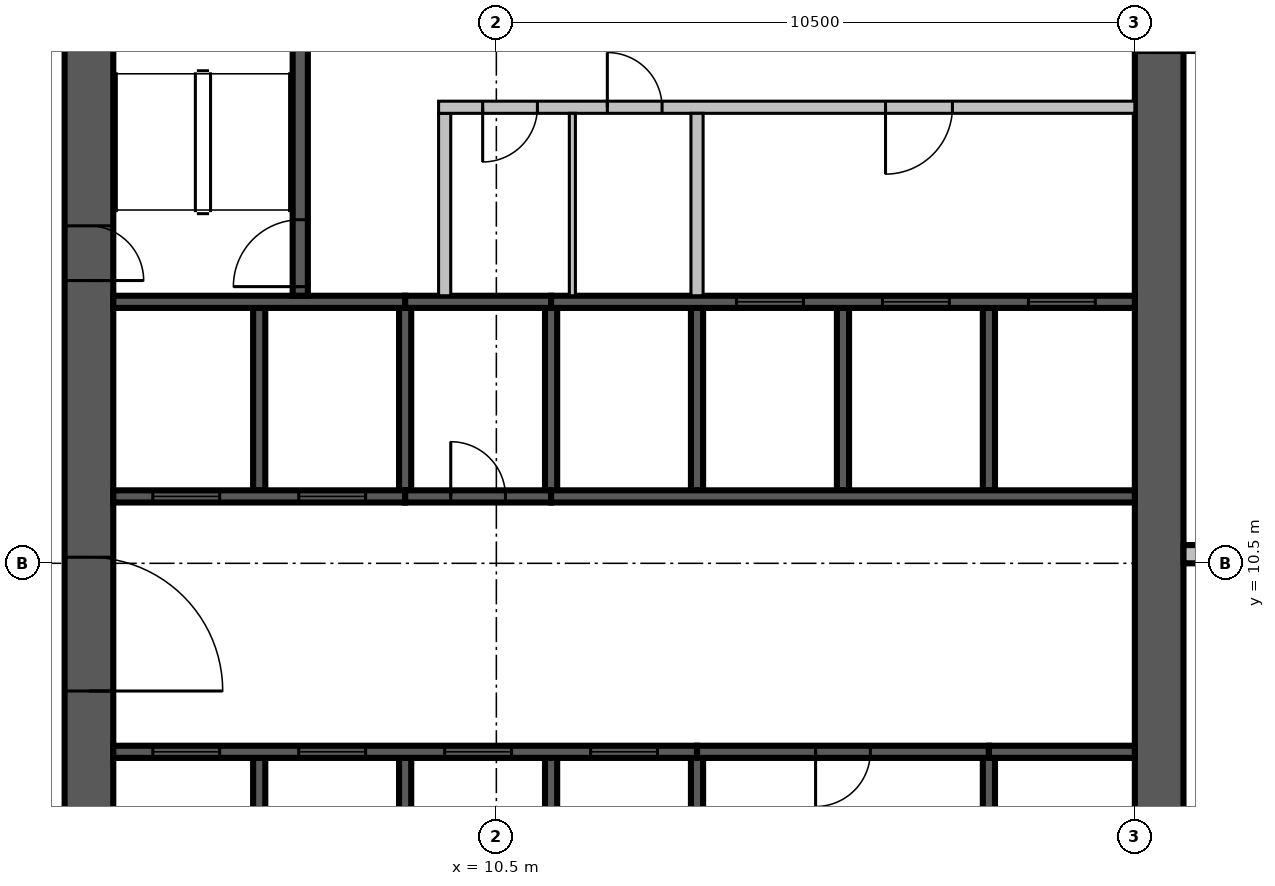
"""IFC4 building model, lengths in metres.
Left out: names, types, materials, properties, quantities, classifications, styles, units other than length and angle.
Written with IfcOpenShell. Run it as: python <this file> out.ifc"""

import sys

from ifc_helpers import new_model, si_unit, direction, frame, frame_2d, origin, place, context, subcontext, project, spatial, rectangle, extrude, source, transform, mapped, element, fill, save


model = new_model("IFC4")
c1 = context("Model", 3, precision=1e-05, world=origin(), true_north=direction((0.0, 1.0)))
c2 = subcontext(c1, "Body", "Model", "MODEL_VIEW")
j1 = project(units=[si_unit("LENGTHUNIT", "METRE"), si_unit("PLANEANGLEUNIT", "RADIAN")], contexts=[c1])
p1 = place(None, origin())
s1 = spatial("IfcSite", under=j1, at=p1, CompositionType="ELEMENT")
p2 = place(p1, origin())
s2 = spatial("IfcBuilding", under=s1, at=p2, CompositionType="ELEMENT")
p3 = place(p2, frame((0.0, 0.0, 208.2)))
s3 = spatial("IfcBuildingStorey", under=s2, at=p3, CompositionType="ELEMENT", Elevation=208.2)
m1 = source(origin(), c2, "Body", "SweptSolid", [
    extrude(rectangle(XDim=17.6, YDim=0.8, at=frame_2d((8.8, 0.0))), origin(), (0.0, 0.0, 1.0), 3.8),
])
p4 = place(p3, frame((3.8, 4.2, 0.0), z_axis=(0.0, 0.0, 1.0), x_axis=(0.0, 1.0, 0.0)))
e1 = element("IfcWall", 1, at=p4, inside=s3, PredefinedType="SHEAR", context=c2, shape_type="MappedRepresentation", body=[
    mapped(m1, transform((0.0, 0.0, 0.0), scale=1.0)),
])
m2 = source(origin(), c2, "Body", "SweptSolid", [
    extrude(rectangle(XDim=2.2, YDim=2.1, at=frame_2d((1.1, 1.05))), frame((0.0, 0.41, 0.0), z_axis=(0.0, -1.0, 0.0), x_axis=(1.0, 0.0, 0.0)), (0.0, 0.0, 1.0), 0.82),
])
p5 = place(p4, frame((4.2, 0.0, 0.0)))
e2 = element("IfcOpeningElement", 2, at=p5, cuts=e1, PredefinedType="OPENING", context=c2, shape_type="MappedRepresentation", body=[
    mapped(m2, transform((0.0, 0.0, 0.0), scale=1.0)),
])
m3 = source(origin(), c2, "Body", "SweptSolid", [
    extrude(rectangle(XDim=0.9, YDim=2.1, at=frame_2d((0.45, 1.05))), frame((0.0, 0.41, 0.0), z_axis=(0.0, -1.0, 0.0), x_axis=(1.0, 0.0, 0.0)), (0.0, 0.0, 1.0), 0.82),
])
p6 = place(p4, frame((10.95, 0.0, 0.0)))
e3 = element("IfcOpeningElement", 3, at=p6, cuts=e1, PredefinedType="OPENING", context=c2, shape_type="MappedRepresentation", body=[
    mapped(m3, transform((0.0, 0.0, 0.0), scale=1.0)),
])
m4 = source(origin(), c2, "Body", "SweptSolid", [
    extrude(rectangle(XDim=16.8, YDim=0.8, at=frame_2d((8.4, 0.0))), origin(), (0.0, 0.0, 1.0), 3.8),
])
p7 = place(p3, frame((21.4, 4.2, 0.0), z_axis=(0.0, 0.0, 1.0), x_axis=(0.0, 1.0, 0.0)))
e4 = element("IfcWall", 4, at=p7, inside=s3, PredefinedType="SHEAR", context=c2, shape_type="MappedRepresentation", body=[
    mapped(m4, transform((0.0, 0.0, 0.0), scale=1.0)),
])
m5 = source(origin(), c2, "Body", "SweptSolid", [
    extrude(rectangle(XDim=1.2, YDim=2.1, at=frame_2d((0.6, 1.05))), frame((0.0, 0.41, 0.0), z_axis=(0.0, -1.0, 0.0), x_axis=(1.0, 0.0, 0.0)), (0.0, 0.0, 1.0), 0.82),
])
p8 = place(p7, frame((14.7, 0.0, 0.0)))
e5 = element("IfcOpeningElement", 5, at=p8, cuts=e4, PredefinedType="OPENING", context=c2, shape_type="MappedRepresentation", body=[
    mapped(m5, transform((0.0, 0.0, 0.0), scale=1.0)),
])
m6 = source(origin(), c2, "Body", "SweptSolid", [
    extrude(rectangle(XDim=7.15, YDim=0.3, at=frame_2d((3.575, 0.0))), origin(), (0.0, 0.0, 1.0), 3.4),
])
p9 = place(p3, frame((21.8, 10.65, 0.0), z_axis=(0.0, 0.0, 1.0), x_axis=(1.0, 0.0, 0.0)))
e6 = element("IfcWall", 6, at=p9, inside=s3, PredefinedType="STANDARD", context=c2, shape_type="MappedRepresentation", body=[
    mapped(m6, transform((0.0, 0.0, 0.0), scale=1.0)),
])
m7 = source(origin(), c2, "Body", "SweptSolid", [
    extrude(rectangle(XDim=1.8, YDim=2.3, at=frame_2d((0.9, 1.15))), frame((0.0, 0.16, 0.0), z_axis=(0.0, -1.0, 0.0), x_axis=(1.0, 0.0, 0.0)), (0.0, 0.0, 1.0), 0.32),
])
p10 = place(p9, frame((0.4, 0.0, 0.6)))
e7 = element("IfcOpeningElement", 7, at=p10, cuts=e6, PredefinedType="OPENING", context=c2, shape_type="MappedRepresentation", body=[
    mapped(m7, transform((0.0, 0.0, 0.0), scale=1.0)),
])
m8 = source(origin(), c2, "Body", "SweptSolid", [
    extrude(rectangle(XDim=3.0, YDim=2.3, at=frame_2d((1.5, 1.15))), frame((0.0, 0.16, 0.0), z_axis=(0.0, -1.0, 0.0), x_axis=(1.0, 0.0, 0.0)), (0.0, 0.0, 1.0), 0.32),
])
p11 = place(p9, frame((4.0, 0.0, 0.6)))
e8 = element("IfcOpeningElement", 8, at=p11, cuts=e6, PredefinedType="OPENING", context=c2, shape_type="MappedRepresentation", body=[
    mapped(m8, transform((0.0, 0.0, 0.0), scale=1.0)),
])
m9 = source(origin(), c2, "Body", "SweptSolid", [
    extrude(rectangle(XDim=3.1, YDim=0.2, at=frame_2d((1.55, 0.0))), origin(), (0.0, 0.0, 1.0), 3.8),
])
for number, where, z_axis, x_axis in (
    (9, (6.6, 4.2, 0.0), (0.0, 0.0, 1.0), (0.0, 1.0, 0.0)),
    (10, (9.0, 4.2, 0.0), (0.0, 0.0, 1.0), (0.0, 1.0, 0.0)),
    (11, (11.4, 4.2, 0.0), (0.0, 0.0, 1.0), (0.0, 1.0, 0.0)),
):
    element("IfcWall", number, at=place(p3, frame(where, z_axis=z_axis, x_axis=x_axis)), inside=s3, PredefinedType="SOLIDWALL", context=c2, shape_type="MappedRepresentation", body=[
        mapped(m9, transform((0.0, 0.0, 0.0), scale=1.0)),
    ])
m10 = source(origin(), c2, "Body", "SweptSolid", [
    extrude(rectangle(XDim=3.1, YDim=0.2, at=frame_2d((1.55, 0.0))), origin(), (0.0, 0.0, 1.0), 3.4),
])
for number, where, z_axis, x_axis in (
    (12, (13.8, 4.2, 0.0), (0.0, 0.0, 1.0), (0.0, 1.0, 0.0)),
    (13, (18.6, 4.2, 0.0), (0.0, 0.0, 1.0), (0.0, 1.0, 0.0)),
):
    element("IfcWall", number, at=place(p3, frame(where, z_axis=z_axis, x_axis=x_axis)), inside=s3, PredefinedType="SOLIDWALL", context=c2, shape_type="MappedRepresentation", body=[
        mapped(m10, transform((0.0, 0.0, 0.0), scale=1.0)),
    ])
m11 = source(origin(), c2, "Body", "SweptSolid", [
    extrude(rectangle(XDim=3.0, YDim=0.2, at=frame_2d((1.5, 0.0))), origin(), (0.0, 0.0, 1.0), 3.8),
])
p12 = place(p3, frame((6.6, 11.7, 0.0), z_axis=(0.0, 0.0, 1.0), x_axis=(0.0, 1.0, 0.0)))
e14 = element("IfcWall", 14, at=p12, inside=s3, PredefinedType="SOLIDWALL", context=c2, shape_type="MappedRepresentation", body=[
    mapped(m11, transform((0.0, 0.0, 0.0), scale=1.0)),
])
m12 = source(origin(), c2, "Body", "SweptSolid", [
    extrude(rectangle(XDim=3.0, YDim=0.2, at=frame_2d((1.5, 0.0))), origin(), (0.0, 0.0, 1.0), 3.4),
])
for number, where, z_axis, x_axis in (
    (15, (9.0, 11.7, 0.0), (0.0, 0.0, 1.0), (0.0, 1.0, 0.0)),
    (16, (11.4, 11.7, 0.0), (0.0, 0.0, 1.0), (0.0, 1.0, 0.0)),
):
    element("IfcWall", number, at=place(p3, frame(where, z_axis=z_axis, x_axis=x_axis)), inside=s3, PredefinedType="SOLIDWALL", context=c2, shape_type="MappedRepresentation", body=[
        mapped(m12, transform((0.0, 0.0, 0.0), scale=1.0)),
    ])
for number, where, z_axis, x_axis in (
    (17, (13.8, 11.7, 0.0), (0.0, 0.0, 1.0), (0.0, 1.0, 0.0)),
    (18, (16.2, 11.7, 0.0), (0.0, 0.0, 1.0), (0.0, 1.0, 0.0)),
    (19, (18.6, 11.7, 0.0), (0.0, 0.0, 1.0), (0.0, 1.0, 0.0)),
):
    element("IfcWall", number, at=place(p3, frame(where, z_axis=z_axis, x_axis=x_axis)), inside=s3, PredefinedType="SOLIDWALL", context=c2, shape_type="MappedRepresentation", body=[
        mapped(m11, transform((0.0, 0.0, 0.0), scale=1.0)),
    ])
m13 = source(origin(), c2, "Body", "SweptSolid", [
    extrude(rectangle(XDim=9.6, YDim=0.2, at=frame_2d((4.8, 0.0))), origin(), (0.0, 0.0, 1.0), 3.8),
])
p13 = place(p3, frame((4.2, 7.4, 0.0), z_axis=(0.0, 0.0, 1.0), x_axis=(1.0, 0.0, 0.0)))
e20 = element("IfcWall", 20, at=p13, inside=s3, PredefinedType="SOLIDWALL", context=c2, shape_type="MappedRepresentation", body=[
    mapped(m13, transform((0.0, 0.0, 0.0), scale=1.0)),
])
m14 = source(origin(), c2, "Body", "SweptSolid", [
    extrude(rectangle(XDim=1.1, YDim=2.1, at=frame_2d((0.55, 1.05))), frame((0.0, 0.11, 0.0), z_axis=(0.0, -1.0, 0.0), x_axis=(1.0, 0.0, 0.0)), (0.0, 0.0, 1.0), 0.22),
])
p14 = place(p13, frame((0.65, 0.0, 0.0)))
e21 = element("IfcOpeningElement", 21, at=p14, cuts=e20, PredefinedType="OPENING", context=c2, shape_type="MappedRepresentation", body=[
    mapped(m14, transform((0.0, 0.0, 0.0), scale=1.0)),
])
p15 = place(p13, frame((3.05, 0.0, 0.0)))
e22 = element("IfcOpeningElement", 22, at=p15, cuts=e20, PredefinedType="OPENING", context=c2, shape_type="MappedRepresentation", body=[
    mapped(m14, transform((0.0, 0.0, 0.0), scale=1.0)),
])
p16 = place(p13, frame((5.45, 0.0, 0.0)))
e23 = element("IfcOpeningElement", 23, at=p16, cuts=e20, PredefinedType="OPENING", context=c2, shape_type="MappedRepresentation", body=[
    mapped(m14, transform((0.0, 0.0, 0.0), scale=1.0)),
])
p17 = place(p13, frame((7.85, 0.0, 0.0)))
e24 = element("IfcOpeningElement", 24, at=p17, cuts=e20, PredefinedType="OPENING", context=c2, shape_type="MappedRepresentation", body=[
    mapped(m14, transform((0.0, 0.0, 0.0), scale=1.0)),
])
m15 = source(origin(), c2, "Body", "SweptSolid", [
    extrude(rectangle(XDim=4.8, YDim=0.2, at=frame_2d((2.4, 0.0))), origin(), (0.0, 0.0, 1.0), 3.4),
])
p18 = place(p3, frame((13.8, 7.4, 0.0), z_axis=(0.0, 0.0, 1.0), x_axis=(1.0, 0.0, 0.0)))
e25 = element("IfcWall", 25, at=p18, inside=s3, PredefinedType="SOLIDWALL", context=c2, shape_type="MappedRepresentation", body=[
    mapped(m15, transform((0.0, 0.0, 0.0), scale=1.0)),
])
m16 = source(origin(), c2, "Body", "SweptSolid", [
    extrude(rectangle(XDim=0.9, YDim=2.1, at=frame_2d((0.45, 1.05))), frame((0.0, 0.11, 0.0), z_axis=(0.0, -1.0, 0.0), x_axis=(1.0, 0.0, 0.0)), (0.0, 0.0, 1.0), 0.22),
])
p19 = place(p18, frame((1.95, 0.0, 0.0)))
e26 = element("IfcOpeningElement", 26, at=p19, cuts=e25, PredefinedType="OPENING", context=c2, shape_type="MappedRepresentation", body=[
    mapped(m16, transform((0.0, 0.0, 0.0), scale=1.0)),
])
m17 = source(origin(), c2, "Body", "SweptSolid", [
    extrude(rectangle(XDim=2.4, YDim=0.2, at=frame_2d((1.2, 0.0))), origin(), (0.0, 0.0, 1.0), 3.8),
])
p20 = place(p3, frame((18.6, 7.4, 0.0), z_axis=(0.0, 0.0, 1.0), x_axis=(1.0, 0.0, 0.0)))
e27 = element("IfcWall", 27, at=p20, inside=s3, PredefinedType="SOLIDWALL", context=c2, shape_type="MappedRepresentation", body=[
    mapped(m17, transform((0.0, 0.0, 0.0), scale=1.0)),
])
m18 = source(origin(), c2, "Body", "SweptSolid", [
    extrude(rectangle(XDim=4.8, YDim=0.2, at=frame_2d((2.4, 0.0))), origin(), (0.0, 0.0, 1.0), 3.8),
])
p21 = place(p3, frame((4.2, 11.6, 0.0), z_axis=(0.0, 0.0, 1.0), x_axis=(1.0, 0.0, 0.0)))
e28 = element("IfcWall", 28, at=p21, inside=s3, PredefinedType="SOLIDWALL", context=c2, shape_type="MappedRepresentation", body=[
    mapped(m18, transform((0.0, 0.0, 0.0), scale=1.0)),
])
p22 = place(p21, frame((0.65, 0.0, 0.0)))
e29 = element("IfcOpeningElement", 29, at=p22, cuts=e28, PredefinedType="OPENING", context=c2, shape_type="MappedRepresentation", body=[
    mapped(m14, transform((0.0, 0.0, 0.0), scale=1.0)),
])
p23 = place(p21, frame((3.05, 0.0, 0.0)))
e30 = element("IfcOpeningElement", 30, at=p23, cuts=e28, PredefinedType="OPENING", context=c2, shape_type="MappedRepresentation", body=[
    mapped(m14, transform((0.0, 0.0, 0.0), scale=1.0)),
])
m19 = source(origin(), c2, "Body", "SweptSolid", [
    extrude(rectangle(XDim=2.4, YDim=0.2, at=frame_2d((1.2, 0.0))), origin(), (0.0, 0.0, 1.0), 3.4),
])
p24 = place(p3, frame((9.0, 11.6, 0.0), z_axis=(0.0, 0.0, 1.0), x_axis=(1.0, 0.0, 0.0)))
e31 = element("IfcWall", 31, at=p24, inside=s3, PredefinedType="SOLIDWALL", context=c2, shape_type="MappedRepresentation", body=[
    mapped(m19, transform((0.0, 0.0, 0.0), scale=1.0)),
])
p25 = place(p24, frame((0.75, 0.0, 0.0)))
e32 = element("IfcOpeningElement", 32, at=p25, cuts=e31, PredefinedType="OPENING", context=c2, shape_type="MappedRepresentation", body=[
    mapped(m16, transform((0.0, 0.0, 0.0), scale=1.0)),
])
p26 = place(p3, frame((11.4, 11.6, 0.0), z_axis=(0.0, 0.0, 1.0), x_axis=(1.0, 0.0, 0.0)))
e33 = element("IfcWall", 33, at=p26, inside=s3, PredefinedType="SOLIDWALL", context=c2, shape_type="MappedRepresentation", body=[
    mapped(m13, transform((0.0, 0.0, 0.0), scale=1.0)),
])
p27 = place(p3, frame((4.2, 14.8, 0.0), z_axis=(0.0, 0.0, 1.0), x_axis=(1.0, 0.0, 0.0)))
e34 = element("IfcWall", 34, at=p27, inside=s3, PredefinedType="SOLIDWALL", context=c2, shape_type="MappedRepresentation", body=[
    mapped(m18, transform((0.0, 0.0, 0.0), scale=1.0)),
])
p28 = place(p3, frame((9.0, 14.8, 0.0), z_axis=(0.0, 0.0, 1.0), x_axis=(1.0, 0.0, 0.0)))
e35 = element("IfcWall", 35, at=p28, inside=s3, PredefinedType="SOLIDWALL", context=c2, shape_type="MappedRepresentation", body=[
    mapped(m19, transform((0.0, 0.0, 0.0), scale=1.0)),
])
p29 = place(p3, frame((11.4, 14.8, 0.0), z_axis=(0.0, 0.0, 1.0), x_axis=(1.0, 0.0, 0.0)))
e36 = element("IfcWall", 36, at=p29, inside=s3, PredefinedType="SOLIDWALL", context=c2, shape_type="MappedRepresentation", body=[
    mapped(m13, transform((0.0, 0.0, 0.0), scale=1.0)),
])
p30 = place(p29, frame((3.05, 0.0, 0.0)))
e37 = element("IfcOpeningElement", 37, at=p30, cuts=e36, PredefinedType="OPENING", context=c2, shape_type="MappedRepresentation", body=[
    mapped(m14, transform((0.0, 0.0, 0.0), scale=1.0)),
])
p31 = place(p29, frame((5.45, 0.0, 0.0)))
e38 = element("IfcOpeningElement", 38, at=p31, cuts=e36, PredefinedType="OPENING", context=c2, shape_type="MappedRepresentation", body=[
    mapped(m14, transform((0.0, 0.0, 0.0), scale=1.0)),
])
p32 = place(p29, frame((7.85, 0.0, 0.0)))
e39 = element("IfcOpeningElement", 39, at=p32, cuts=e36, PredefinedType="OPENING", context=c2, shape_type="MappedRepresentation", body=[
    mapped(m14, transform((0.0, 0.0, 0.0), scale=1.0)),
])
m20 = source(origin(), c2, "Body", "SweptSolid", [
    extrude(rectangle(XDim=6.6, YDim=0.25, at=frame_2d((3.3, 0.0))), origin(), (0.0, 0.0, 1.0), 3.4),
])
p33 = place(p3, frame((7.275, 14.9, 0.0), z_axis=(0.0, 0.0, 1.0), x_axis=(0.0, 1.0, 0.0)))
e40 = element("IfcWall", 40, at=p33, inside=s3, PredefinedType="SOLIDWALL", context=c2, shape_type="MappedRepresentation", body=[
    mapped(m20, transform((0.0, 0.0, 0.0), scale=1.0)),
])
m21 = source(origin(), c2, "Body", "SweptSolid", [
    extrude(rectangle(XDim=1.1, YDim=2.1, at=frame_2d((0.55, 1.05))), frame((0.0, 0.135, 0.0), z_axis=(0.0, -1.0, 0.0), x_axis=(1.0, 0.0, 0.0)), (0.0, 0.0, 1.0), 0.27),
])
p34 = place(p33, frame((0.15, 0.0, 0.0)))
e41 = element("IfcOpeningElement", 41, at=p34, cuts=e40, PredefinedType="OPENING", context=c2, shape_type="MappedRepresentation", body=[
    mapped(m21, transform((0.0, 0.0, 0.0), scale=1.0)),
])
m22 = source(origin(), c2, "Body", "SweptSolid", [
    extrude(rectangle(XDim=3.0, YDim=0.2, at=frame_2d((1.5, 0.0))), origin(), (0.0, 0.0, 1.0), 3.4),
])
p35 = place(p3, frame((9.65, 14.9, 0.0), z_axis=(0.0, 0.0, 1.0), x_axis=(0.0, 1.0, 0.0)))
e42 = element("IfcWall", 42, at=p35, inside=s3, PredefinedType="PARTITIONING", context=c2, shape_type="MappedRepresentation", body=[
    mapped(m22, transform((0.0, 0.0, 0.0), scale=1.0)),
])
m23 = source(origin(), c2, "Body", "SweptSolid", [
    extrude(rectangle(XDim=11.45, YDim=0.2, at=frame_2d((5.725, 0.0))), origin(), (0.0, 0.0, 1.0), 3.4),
])
p36 = place(p3, frame((9.55, 18.0, 0.0), z_axis=(0.0, 0.0, 1.0), x_axis=(1.0, 0.0, 0.0)))
e43 = element("IfcWall", 43, at=p36, inside=s3, PredefinedType="PARTITIONING", context=c2, shape_type="MappedRepresentation", body=[
    mapped(m23, transform((0.0, 0.0, 0.0), scale=1.0)),
])
p37 = place(p36, frame((0.725, 0.0, 0.0)))
e44 = element("IfcOpeningElement", 44, at=p37, cuts=e43, PredefinedType="OPENING", context=c2, shape_type="MappedRepresentation", body=[
    mapped(m16, transform((0.0, 0.0, 0.0), scale=1.0)),
])
p38 = place(p36, frame((2.775, 0.0, 0.0)))
e45 = element("IfcOpeningElement", 45, at=p38, cuts=e43, PredefinedType="OPENING", context=c2, shape_type="MappedRepresentation", body=[
    mapped(m16, transform((0.0, 0.0, 0.0), scale=1.0)),
])
p39 = place(p36, frame((7.35, 0.0, 0.0)))
e46 = element("IfcOpeningElement", 46, at=p39, cuts=e43, PredefinedType="OPENING", context=c2, shape_type="MappedRepresentation", body=[
    mapped(m14, transform((0.0, 0.0, 0.0), scale=1.0)),
])
p40 = place(p3, frame((13.8, 14.9, 0.0), z_axis=(0.0, 0.0, 1.0), x_axis=(0.0, 1.0, 0.0)))
e47 = element("IfcWall", 47, at=p40, inside=s3, PredefinedType="PARTITIONING", context=c2, shape_type="MappedRepresentation", body=[
    mapped(m22, transform((0.0, 0.0, 0.0), scale=1.0)),
])
m24 = source(origin(), c2, "Body", "SweptSolid", [
    extrude(rectangle(XDim=3.0, YDim=0.1, at=frame_2d((1.5, 0.0))), origin(), (0.0, 0.0, 1.0), 3.4),
])
p41 = place(p3, frame((11.75, 14.9, 0.0), z_axis=(0.0, 0.0, 1.0), x_axis=(0.0, 1.0, 0.0)))
e48 = element("IfcWall", 48, at=p41, inside=s3, PredefinedType="PARTITIONING", context=c2, shape_type="MappedRepresentation", body=[
    mapped(m24, transform((0.0, 0.0, 0.0), scale=1.0)),
])
m25 = source(origin(), c2, "Body", "SweptSolid", [
    extrude(rectangle(XDim=1.1, YDim=2.1, at=frame_2d((0.55, 1.05))), frame((0.0, 0.025, 0.0), z_axis=(0.0, -1.0, 0.0), x_axis=(1.0, 0.0, 0.0)), (0.0, 0.0, 1.0), 0.05),
])
p42 = place(p14, origin())
e49 = element("IfcDoor", 49, at=p42, inside=s3, OperationType="SLIDING_TO_LEFT", PredefinedType="DOOR", context=c2, shape_type="MappedRepresentation", body=[
    mapped(m25, transform((0.0, 0.0, 0.0), scale=1.0)),
])
fill(e21, e49)
p43 = place(p15, origin())
e50 = element("IfcDoor", 50, at=p43, inside=s3, OperationType="SLIDING_TO_LEFT", PredefinedType="DOOR", context=c2, shape_type="MappedRepresentation", body=[
    mapped(m25, transform((0.0, 0.0, 0.0), scale=1.0)),
])
fill(e22, e50)
p44 = place(p16, origin())
e51 = element("IfcDoor", 51, at=p44, inside=s3, OperationType="SLIDING_TO_LEFT", PredefinedType="DOOR", context=c2, shape_type="MappedRepresentation", body=[
    mapped(m25, transform((0.0, 0.0, 0.0), scale=1.0)),
])
fill(e23, e51)
p45 = place(p17, origin())
e52 = element("IfcDoor", 52, at=p45, inside=s3, OperationType="SLIDING_TO_LEFT", PredefinedType="DOOR", context=c2, shape_type="MappedRepresentation", body=[
    mapped(m25, transform((0.0, 0.0, 0.0), scale=1.0)),
])
fill(e24, e52)
m26 = source(origin(), c2, "Body", "SweptSolid", [
    extrude(rectangle(XDim=0.9, YDim=2.1, at=frame_2d((0.45, 1.05))), frame((0.0, 0.025, 0.0), z_axis=(0.0, -1.0, 0.0), x_axis=(1.0, 0.0, 0.0)), (0.0, 0.0, 1.0), 0.05),
])
p46 = place(p19, origin())
e53 = element("IfcDoor", 53, at=p46, inside=s3, OperationType="SINGLE_SWING_RIGHT", PredefinedType="DOOR", context=c2, shape_type="MappedRepresentation", body=[
    mapped(m26, transform((0.0, 0.0, 0.0), scale=1.0)),
])
fill(e26, e53)
p47 = place(p22, origin())
e54 = element("IfcDoor", 54, at=p47, inside=s3, OperationType="SLIDING_TO_LEFT", PredefinedType="DOOR", context=c2, shape_type="MappedRepresentation", body=[
    mapped(m25, transform((0.0, 0.0, 0.0), scale=1.0)),
])
fill(e29, e54)
p48 = place(p23, origin())
e55 = element("IfcDoor", 55, at=p48, inside=s3, OperationType="SLIDING_TO_LEFT", PredefinedType="DOOR", context=c2, shape_type="MappedRepresentation", body=[
    mapped(m25, transform((0.0, 0.0, 0.0), scale=1.0)),
])
fill(e30, e55)
p49 = place(p25, origin())
e56 = element("IfcDoor", 56, at=p49, inside=s3, OperationType="SINGLE_SWING_LEFT", PredefinedType="DOOR", context=c2, shape_type="MappedRepresentation", body=[
    mapped(m26, transform((0.0, 0.0, 0.0), scale=1.0)),
])
fill(e32, e56)
p50 = place(p30, origin())
e57 = element("IfcDoor", 57, at=p50, inside=s3, OperationType="SLIDING_TO_LEFT", PredefinedType="DOOR", context=c2, shape_type="MappedRepresentation", body=[
    mapped(m25, transform((0.0, 0.0, 0.0), scale=1.0)),
])
fill(e37, e57)
p51 = place(p31, origin())
e58 = element("IfcDoor", 58, at=p51, inside=s3, OperationType="SLIDING_TO_LEFT", PredefinedType="DOOR", context=c2, shape_type="MappedRepresentation", body=[
    mapped(m25, transform((0.0, 0.0, 0.0), scale=1.0)),
])
fill(e38, e58)
p52 = place(p32, origin())
e59 = element("IfcDoor", 59, at=p52, inside=s3, OperationType="SLIDING_TO_LEFT", PredefinedType="DOOR", context=c2, shape_type="MappedRepresentation", body=[
    mapped(m25, transform((0.0, 0.0, 0.0), scale=1.0)),
])
fill(e39, e59)
p53 = place(p34, origin())
e60 = element("IfcDoor", 60, at=p53, inside=s3, OperationType="SINGLE_SWING_LEFT", PredefinedType="DOOR", context=c2, shape_type="MappedRepresentation", body=[
    mapped(m25, transform((0.0, 0.0, 0.0), scale=1.0)),
])
fill(e41, e60)
p54 = place(p37, origin())
e61 = element("IfcDoor", 61, at=p54, inside=s3, OperationType="SINGLE_SWING_RIGHT", PredefinedType="DOOR", context=c2, shape_type="MappedRepresentation", body=[
    mapped(m26, transform((0.0, 0.0, 0.0), scale=1.0)),
])
fill(e44, e61)
p55 = place(p38, origin())
e62 = element("IfcDoor", 62, at=p55, inside=s3, OperationType="SINGLE_SWING_LEFT", PredefinedType="DOOR", context=c2, shape_type="MappedRepresentation", body=[
    mapped(m26, transform((0.0, 0.0, 0.0), scale=1.0)),
])
fill(e45, e62)
p56 = place(p39, origin())
e63 = element("IfcDoor", 63, at=p56, inside=s3, OperationType="SINGLE_SWING_RIGHT", PredefinedType="DOOR", context=c2, shape_type="MappedRepresentation", body=[
    mapped(m25, transform((0.0, 0.0, 0.0), scale=1.0)),
])
fill(e46, e63)
m27 = source(origin(), c2, "Body", "SweptSolid", [
    extrude(rectangle(XDim=2.2, YDim=2.1, at=frame_2d((1.1, 1.05))), frame((0.0, 0.025, 0.0), z_axis=(0.0, -1.0, 0.0), x_axis=(1.0, 0.0, 0.0)), (0.0, 0.0, 1.0), 0.05),
])
p57 = place(p5, origin())
e64 = element("IfcDoor", 64, at=p57, inside=s3, OperationType="DOUBLE_DOOR_SINGLE_SWING", PredefinedType="DOOR", context=c2, shape_type="MappedRepresentation", body=[
    mapped(m27, transform((0.0, 0.0, 0.0), scale=1.0)),
])
fill(e2, e64)
p58 = place(p6, origin())
e65 = element("IfcDoor", 65, at=p58, inside=s3, OperationType="SINGLE_SWING_RIGHT", PredefinedType="DOOR", context=c2, shape_type="MappedRepresentation", body=[
    mapped(m26, transform((0.0, 0.0, 0.0), scale=1.0)),
])
fill(e3, e65)
save(model, sys.argv[1])
